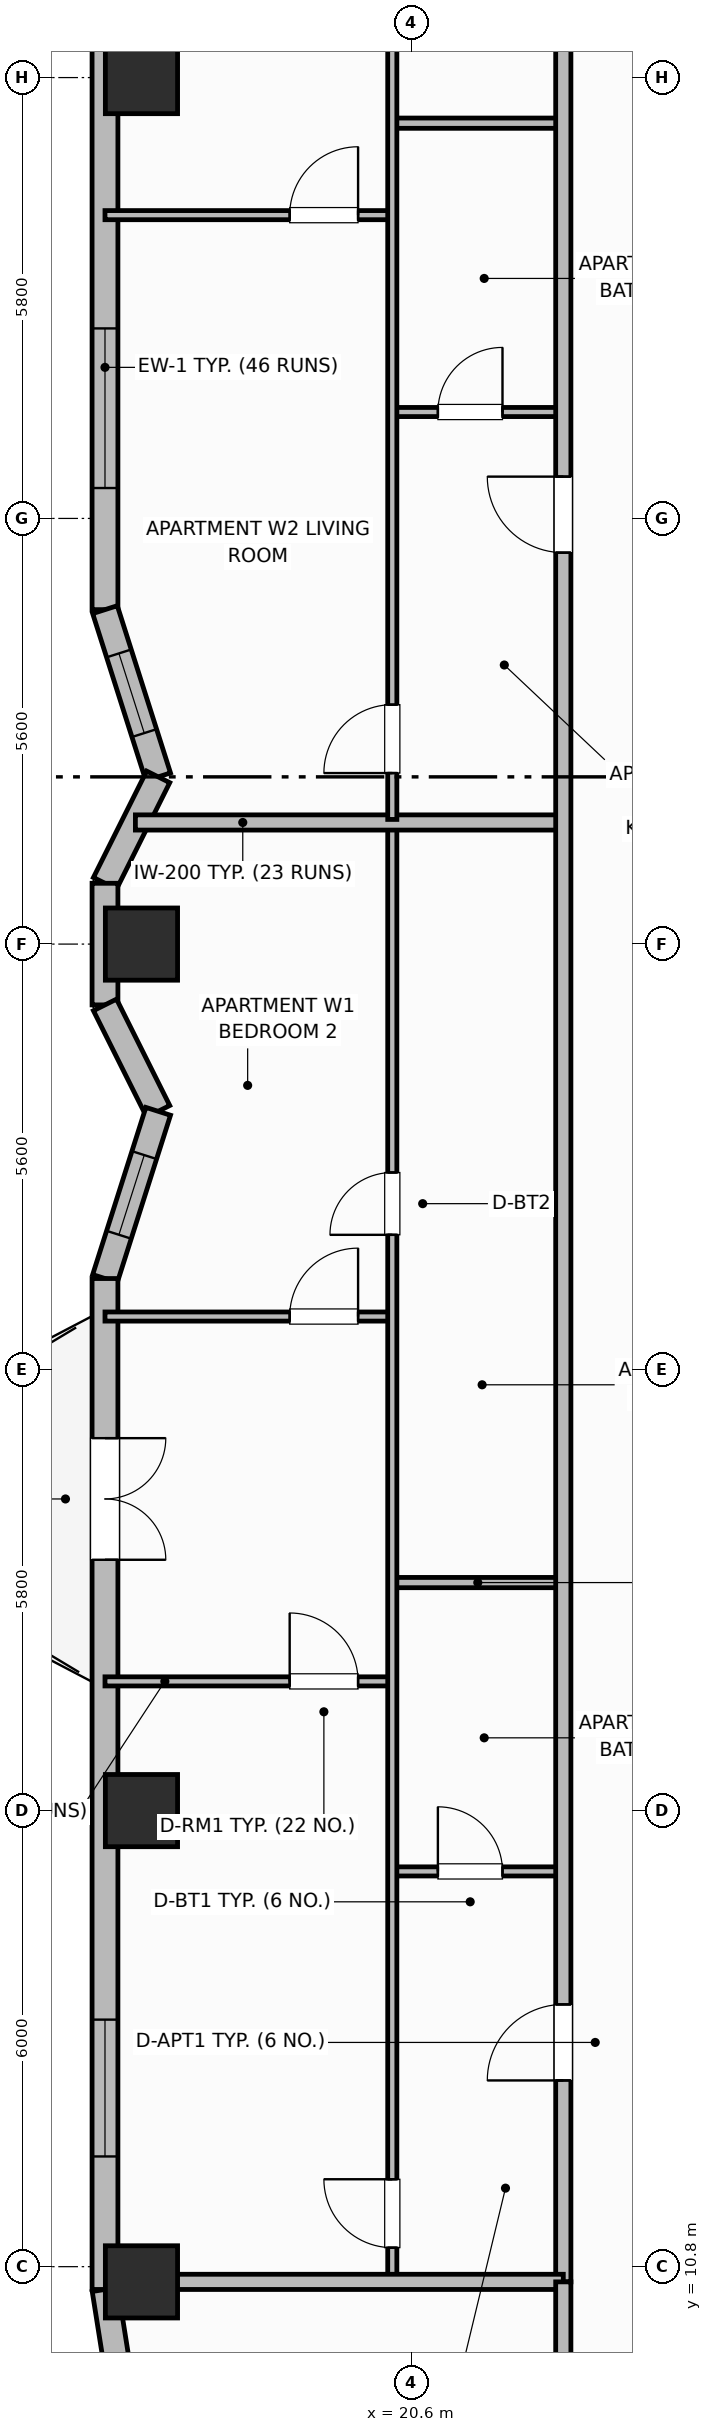
"""IFC4 building model, lengths in metres.
Left out: names, types, materials, properties, quantities, classifications, styles, units other than length and angle.
Written with IfcOpenShell. Run it as: python <this file> out.ifc"""

import sys

from ifc_helpers import new_model, si_unit, direction, frame, frame_2d, origin, origin_2d, place, context, subcontext, project, spatial, rectangle, extrude, element, fill, save


model = new_model("IFC4")
c1 = context("Model", 3, precision=1e-05, world=origin(), true_north=direction((0.0, 1.0)))
c2 = subcontext(c1, "Body", "Model", "MODEL_VIEW")
j1 = project(units=[si_unit("LENGTHUNIT", "METRE"), si_unit("PLANEANGLEUNIT", "RADIAN")], contexts=[c1])
p1 = place(None, origin())
s1 = spatial("IfcSite", under=j1, at=p1, CompositionType="ELEMENT")
p2 = place(p1, origin())
s2 = spatial("IfcBuilding", under=s1, at=p2, CompositionType="ELEMENT")
p3 = place(p2, frame((0.0, 0.0, 181.1)))
s3 = spatial("IfcBuildingStorey", under=s2, at=p3, CompositionType="ELEMENT", Elevation=181.1)
for number, where, z_axis, x_axis in (
    (1, (17.05, 10.6, 0.0), (0.0, 0.0, 1.0), (1.0, 0.0, 0.0)),
    (2, (17.05, 16.8, 0.0), (0.0, 0.0, 1.0), (1.0, 0.0, 0.0)),
    (3, (17.05, 28.2, 0.0), (0.0, 0.0, 1.0), (1.0, 0.0, 0.0)),
    (4, (17.05, 39.6, 0.0), (0.0, 0.0, 1.0), (1.0, 0.0, 0.0)),
):
    element("IfcColumn", number, at=place(p3, frame(where, z_axis=z_axis, x_axis=x_axis)), inside=s3, PredefinedType="COLUMN", context=c2, shape_type="SweptSolid", body=[
        extrude(rectangle(XDim=0.95, YDim=0.95, at=origin_2d()), origin(), (0.0, 0.0, 1.0), 3.7),
    ])
p4 = place(p3, frame((16.57, 10.5, 0.0), z_axis=(0.0, 0.0, 1.0), x_axis=(0.156514556949, -0.987675651954, 0.0)))
e5 = element("IfcWall", 5, at=p4, inside=s3, PredefinedType="SOLIDWALL", context=c2, shape_type="SweptSolid", body=[
    extrude(rectangle(XDim=1.135, YDim=0.34, at=frame_2d((0.568, 0.0))), origin(), (0.0, 0.0, 1.0), 2.72),
])
p5 = place(p3, frame((16.57, 45.9, 0.0), z_axis=(0.0, 0.0, 1.0), x_axis=(0.0, -1.0, 0.0)))
e6 = element("IfcWall", 6, at=p5, inside=s3, PredefinedType="SOLIDWALL", context=c2, shape_type="SweptSolid", body=[
    extrude(rectangle(XDim=13.3, YDim=0.34, at=frame_2d((6.65, 0.0))), origin(), (0.0, 0.0, 1.0), 2.72),
])
p6 = place(p5, frame((1.6, 0.0, 0.7)))
e7 = element("IfcOpeningElement", 7, at=p6, cuts=e6, PredefinedType="OPENING", context=c2, shape_type="SweptSolid", body=[
    extrude(rectangle(XDim=2.1, YDim=1.9, at=frame_2d((1.05, 0.95))), frame((0.0, 0.18, 0.0), z_axis=(0.0, -1.0, 0.0), x_axis=(1.0, 0.0, 0.0)), (0.0, 0.0, 1.0), 0.36),
])
p7 = place(p5, frame((9.6, 0.0, 0.7)))
e8 = element("IfcOpeningElement", 8, at=p7, cuts=e6, PredefinedType="OPENING", context=c2, shape_type="SweptSolid", body=[
    extrude(rectangle(XDim=2.1, YDim=1.9, at=frame_2d((1.05, 0.95))), frame((0.0, 0.18, 0.0), z_axis=(0.0, -1.0, 0.0), x_axis=(1.0, 0.0, 0.0)), (0.0, 0.0, 1.0), 0.36),
])
p8 = place(p3, frame((16.57, 32.6, 0.0), z_axis=(0.0, 0.0, 1.0), x_axis=(0.303160011437, -0.952939666225, 0.0)))
e9 = element("IfcWall", 9, at=p8, inside=s3, PredefinedType="SOLIDWALL", context=c2, shape_type="SweptSolid", body=[
    extrude(rectangle(XDim=2.309, YDim=0.34, at=frame_2d((1.154, 0.0))), origin(), (0.0, 0.0, 1.0), 2.72),
])
p9 = place(p8, frame((0.604, 0.0, 0.91)))
e10 = element("IfcOpeningElement", 10, at=p9, cuts=e9, PredefinedType="OPENING", context=c2, shape_type="SweptSolid", body=[
    extrude(rectangle(XDim=1.1, YDim=1.65, at=frame_2d((0.55, 0.825))), frame((0.0, 0.18, 0.0), z_axis=(0.0, -1.0, 0.0), x_axis=(1.0, 0.0, 0.0)), (0.0, 0.0, 1.0), 0.36),
])
p10 = place(p3, frame((17.27, 30.4, 0.0), z_axis=(0.0, 0.0, 1.0), x_axis=(-0.4472135955, -0.894427191, 0.0)))
e11 = element("IfcWall", 11, at=p10, inside=s3, PredefinedType="SOLIDWALL", context=c2, shape_type="SweptSolid", body=[
    extrude(rectangle(XDim=1.565, YDim=0.34, at=frame_2d((0.783, 0.0))), origin(), (0.0, 0.0, 1.0), 2.72),
])
p11 = place(p3, frame((16.57, 29.0, 0.0), z_axis=(0.0, 0.0, 1.0), x_axis=(0.0, -1.0, 0.0)))
e12 = element("IfcWall", 12, at=p11, inside=s3, PredefinedType="SOLIDWALL", context=c2, shape_type="SweptSolid", body=[
    extrude(rectangle(XDim=1.6, YDim=0.34, at=frame_2d((0.8, 0.0))), origin(), (0.0, 0.0, 1.0), 2.72),
])
p12 = place(p3, frame((16.57, 27.4, 0.0), z_axis=(0.0, 0.0, 1.0), x_axis=(0.4472135955, -0.894427191, 0.0)))
e13 = element("IfcWall", 13, at=p12, inside=s3, PredefinedType="SOLIDWALL", context=c2, shape_type="SweptSolid", body=[
    extrude(rectangle(XDim=1.565, YDim=0.34, at=frame_2d((0.783, 0.0))), origin(), (0.0, 0.0, 1.0), 2.72),
])
p13 = place(p3, frame((17.27, 26.0, 0.0), z_axis=(0.0, 0.0, 1.0), x_axis=(-0.303190562272, -0.952929946507, 0.0)))
e14 = element("IfcWall", 14, at=p13, inside=s3, PredefinedType="SOLIDWALL", context=c2, shape_type="SweptSolid", body=[
    extrude(rectangle(XDim=2.309, YDim=0.34, at=frame_2d((1.154, 0.0))), origin(), (0.0, 0.0, 1.0), 2.72),
])
p14 = place(p13, frame((0.604, 0.0, 0.91)))
e15 = element("IfcOpeningElement", 15, at=p14, cuts=e14, PredefinedType="OPENING", context=c2, shape_type="SweptSolid", body=[
    extrude(rectangle(XDim=1.1, YDim=1.65, at=frame_2d((0.55, 0.825))), frame((0.0, 0.18, 0.0), z_axis=(0.0, -1.0, 0.0), x_axis=(1.0, 0.0, 0.0)), (0.0, 0.0, 1.0), 0.36),
])
p15 = place(p3, frame((16.57, 23.8, 0.0), z_axis=(0.0, 0.0, 1.0), x_axis=(0.0, -1.0, 0.0)))
e16 = element("IfcWall", 16, at=p15, inside=s3, PredefinedType="SOLIDWALL", context=c2, shape_type="SweptSolid", body=[
    extrude(rectangle(XDim=13.3, YDim=0.34, at=frame_2d((6.65, 0.0))), origin(), (0.0, 0.0, 1.0), 2.72),
])
p16 = place(p15, frame((2.1, 0.0, 0.0)))
e17 = element("IfcOpeningElement", 17, at=p16, cuts=e16, PredefinedType="OPENING", context=c2, shape_type="SweptSolid", body=[
    extrude(rectangle(XDim=1.6, YDim=2.1, at=frame_2d((0.8, 1.05))), frame((0.0, 0.18, 0.0), z_axis=(0.0, -1.0, 0.0), x_axis=(1.0, 0.0, 0.0)), (0.0, 0.0, 1.0), 0.36),
])
p17 = place(p15, frame((9.75, 0.0, 0.75)))
e18 = element("IfcOpeningElement", 18, at=p17, cuts=e16, PredefinedType="OPENING", context=c2, shape_type="SweptSolid", body=[
    extrude(rectangle(XDim=1.8, YDim=1.85, at=frame_2d((0.9, 0.925))), frame((0.0, 0.18, 0.0), z_axis=(0.0, -1.0, 0.0), x_axis=(1.0, 0.0, 0.0)), (0.0, 0.0, 1.0), 0.36),
])
p18 = place(p3, frame((20.35, 16.0, 0.0), z_axis=(0.0, 0.0, 1.0), x_axis=(1.0, 0.0, 0.0)))
e19 = element("IfcWall", 19, at=p18, inside=s3, PredefinedType="PARTITIONING", context=c2, shape_type="SweptSolid", body=[
    extrude(rectangle(XDim=2.25, YDim=0.12, at=frame_2d((1.125, 0.0))), origin(), (0.0, 0.0, 1.0), 2.55),
])
p19 = place(p18, frame((0.6, 0.0, 0.0)))
e20 = element("IfcOpeningElement", 20, at=p19, cuts=e19, PredefinedType="OPENING", context=c2, shape_type="SweptSolid", body=[
    extrude(rectangle(XDim=0.85, YDim=2.1, at=frame_2d((0.425, 1.05))), frame((0.0, 0.07, 0.0), z_axis=(0.0, -1.0, 0.0), x_axis=(1.0, 0.0, 0.0)), (0.0, 0.0, 1.0), 0.14),
])
p20 = place(p3, frame((20.35, 19.8, 0.0), z_axis=(0.0, 0.0, 1.0), x_axis=(1.0, 0.0, 0.0)))
e21 = element("IfcWall", 21, at=p20, inside=s3, PredefinedType="PARTITIONING", context=c2, shape_type="SweptSolid", body=[
    extrude(rectangle(XDim=2.25, YDim=0.135, at=frame_2d((1.125, 0.0))), origin(), (0.0, 0.0, 1.0), 2.55),
])
p21 = place(p3, frame((16.57, 18.5, 0.0), z_axis=(0.0, 0.0, 1.0), x_axis=(1.0, 0.0, 0.0)))
e22 = element("IfcWall", 22, at=p21, inside=s3, PredefinedType="PARTITIONING", context=c2, shape_type="SweptSolid", body=[
    extrude(rectangle(XDim=3.78, YDim=0.12, at=frame_2d((1.89, 0.0))), origin(), (0.0, 0.0, 1.0), 2.55),
])
p22 = place(p21, frame((2.43, 0.0, 0.0)))
e23 = element("IfcOpeningElement", 23, at=p22, cuts=e22, PredefinedType="OPENING", context=c2, shape_type="SweptSolid", body=[
    extrude(rectangle(XDim=0.9, YDim=2.1, at=frame_2d((0.45, 1.05))), frame((0.0, 0.07, 0.0), z_axis=(0.0, -1.0, 0.0), x_axis=(1.0, 0.0, 0.0)), (0.0, 0.0, 1.0), 0.14),
])
p23 = place(p3, frame((16.57, 23.3, 0.0), z_axis=(0.0, 0.0, 1.0), x_axis=(1.0, 0.0, 0.0)))
e24 = element("IfcWall", 24, at=p23, inside=s3, PredefinedType="PARTITIONING", context=c2, shape_type="SweptSolid", body=[
    extrude(rectangle(XDim=3.78, YDim=0.12, at=frame_2d((1.89, 0.0))), origin(), (0.0, 0.0, 1.0), 2.55),
])
p24 = place(p23, frame((2.43, 0.0, 0.0)))
e25 = element("IfcOpeningElement", 25, at=p24, cuts=e24, PredefinedType="OPENING", context=c2, shape_type="SweptSolid", body=[
    extrude(rectangle(XDim=0.9, YDim=2.1, at=frame_2d((0.45, 1.05))), frame((0.0, 0.07, 0.0), z_axis=(0.0, -1.0, 0.0), x_axis=(1.0, 0.0, 0.0)), (0.0, 0.0, 1.0), 0.14),
])
p25 = place(p3, frame((20.35, 10.64, 0.0), z_axis=(0.0, 0.0, 1.0), x_axis=(0.0, 1.0, 0.0)))
e26 = element("IfcWall", 26, at=p25, inside=s3, PredefinedType="PARTITIONING", context=c2, shape_type="SweptSolid", body=[
    extrude(rectangle(XDim=19.12, YDim=0.12, at=frame_2d((9.56, 0.0))), origin(), (0.0, 0.0, 1.0), 2.55),
])
p26 = place(p25, frame((0.41, 0.0, 0.0)))
e27 = element("IfcOpeningElement", 27, at=p26, cuts=e26, PredefinedType="OPENING", context=c2, shape_type="SweptSolid", body=[
    extrude(rectangle(XDim=0.9, YDim=2.1, at=frame_2d((0.45, 1.05))), frame((0.0, 0.07, 0.0), z_axis=(0.0, -1.0, 0.0), x_axis=(1.0, 0.0, 0.0)), (0.0, 0.0, 1.0), 0.14),
])
p27 = place(p25, frame((13.735, 0.0, 0.0)))
e28 = element("IfcOpeningElement", 28, at=p27, cuts=e26, PredefinedType="OPENING", context=c2, shape_type="SweptSolid", body=[
    extrude(rectangle(XDim=0.82, YDim=2.08, at=frame_2d((0.41, 1.04))), frame((0.0, 0.07, 0.0), z_axis=(0.0, -1.0, 0.0), x_axis=(1.0, 0.0, 0.0)), (0.0, 0.0, 1.0), 0.14),
])
p28 = place(p3, frame((16.97, 29.8, 0.0), z_axis=(0.0, 0.0, 1.0), x_axis=(1.0, 0.0, 0.0)))
e29 = element("IfcWall", 29, at=p28, inside=s3, PredefinedType="PARTITIONING", context=c2, shape_type="SweptSolid", body=[
    extrude(rectangle(XDim=5.63, YDim=0.2, at=frame_2d((2.815, 0.0))), origin(), (0.0, 0.0, 1.0), 2.55),
])
p29 = place(p3, frame((20.35, 35.2, 0.0), z_axis=(0.0, 0.0, 1.0), x_axis=(1.0, 0.0, 0.0)))
e30 = element("IfcWall", 30, at=p29, inside=s3, PredefinedType="PARTITIONING", context=c2, shape_type="SweptSolid", body=[
    extrude(rectangle(XDim=2.25, YDim=0.12, at=frame_2d((1.125, 0.0))), origin(), (0.0, 0.0, 1.0), 2.55),
])
p30 = place(p29, frame((0.6, 0.0, 0.0)))
e31 = element("IfcOpeningElement", 31, at=p30, cuts=e30, PredefinedType="OPENING", context=c2, shape_type="SweptSolid", body=[
    extrude(rectangle(XDim=0.85, YDim=2.1, at=frame_2d((0.425, 1.05))), frame((0.0, 0.07, 0.0), z_axis=(0.0, -1.0, 0.0), x_axis=(1.0, 0.0, 0.0)), (0.0, 0.0, 1.0), 0.14),
])
p31 = place(p3, frame((20.35, 39.0, 0.0), z_axis=(0.0, 0.0, 1.0), x_axis=(1.0, 0.0, 0.0)))
e32 = element("IfcWall", 32, at=p31, inside=s3, PredefinedType="PARTITIONING", context=c2, shape_type="SweptSolid", body=[
    extrude(rectangle(XDim=2.25, YDim=0.135, at=frame_2d((1.125, 0.0))), origin(), (0.0, 0.0, 1.0), 2.55),
])
p32 = place(p3, frame((16.57, 37.79, 0.0), z_axis=(0.0, 0.0, 1.0), x_axis=(1.0, 0.0, 0.0)))
e33 = element("IfcWall", 33, at=p32, inside=s3, PredefinedType="PARTITIONING", context=c2, shape_type="SweptSolid", body=[
    extrude(rectangle(XDim=3.78, YDim=0.12, at=frame_2d((1.89, 0.0))), origin(), (0.0, 0.0, 1.0), 2.55),
])
p33 = place(p32, frame((2.43, 0.0, 0.0)))
e34 = element("IfcOpeningElement", 34, at=p33, cuts=e33, PredefinedType="OPENING", context=c2, shape_type="SweptSolid", body=[
    extrude(rectangle(XDim=0.9, YDim=2.1, at=frame_2d((0.45, 1.05))), frame((0.0, 0.07, 0.0), z_axis=(0.0, -1.0, 0.0), x_axis=(1.0, 0.0, 0.0)), (0.0, 0.0, 1.0), 0.14),
])
p34 = place(p3, frame((20.35, 29.84, 0.0), z_axis=(0.0, 0.0, 1.0), x_axis=(0.0, 1.0, 0.0)))
e35 = element("IfcWall", 35, at=p34, inside=s3, PredefinedType="PARTITIONING", context=c2, shape_type="SweptSolid", body=[
    extrude(rectangle(XDim=15.92, YDim=0.12, at=frame_2d((7.96, 0.0))), origin(), (0.0, 0.0, 1.0), 2.55),
])
p35 = place(p34, frame((0.61, 0.0, 0.0)))
e36 = element("IfcOpeningElement", 36, at=p35, cuts=e35, PredefinedType="OPENING", context=c2, shape_type="SweptSolid", body=[
    extrude(rectangle(XDim=0.9, YDim=2.1, at=frame_2d((0.45, 1.05))), frame((0.0, 0.07, 0.0), z_axis=(0.0, -1.0, 0.0), x_axis=(1.0, 0.0, 0.0)), (0.0, 0.0, 1.0), 0.14),
])
p36 = place(p34, frame((12.135, 0.0, 0.0)))
e37 = element("IfcOpeningElement", 37, at=p36, cuts=e35, PredefinedType="OPENING", context=c2, shape_type="SweptSolid", body=[
    extrude(rectangle(XDim=0.82, YDim=2.08, at=frame_2d((0.41, 1.04))), frame((0.0, 0.07, 0.0), z_axis=(0.0, -1.0, 0.0), x_axis=(1.0, 0.0, 0.0)), (0.0, 0.0, 1.0), 0.14),
])
p37 = place(p3, frame((22.6, 10.6, 0.0), z_axis=(0.0, 0.0, 1.0), x_axis=(0.0, 1.0, 0.0)))
e38 = element("IfcWall", 38, at=p37, inside=s3, PredefinedType="PARTITIONING", context=c2, shape_type="SweptSolid", body=[
    extrude(rectangle(XDim=35.2, YDim=0.2, at=frame_2d((17.6, 0.0))), origin(), (0.0, 0.0, 1.0), 2.55),
])
p38 = place(p37, frame((2.65, 0.0, 0.0)))
e39 = element("IfcOpeningElement", 39, at=p38, cuts=e38, PredefinedType="OPENING", context=c2, shape_type="SweptSolid", body=[
    extrude(rectangle(XDim=1.0, YDim=2.15, at=frame_2d((0.5, 1.075))), frame((0.0, 0.11, 0.0), z_axis=(0.0, -1.0, 0.0), x_axis=(1.0, 0.0, 0.0)), (0.0, 0.0, 1.0), 0.22),
])
p39 = place(p37, frame((22.75, 0.0, 0.0)))
e40 = element("IfcOpeningElement", 40, at=p39, cuts=e38, PredefinedType="OPENING", context=c2, shape_type="SweptSolid", body=[
    extrude(rectangle(XDim=1.0, YDim=2.15, at=frame_2d((0.5, 1.075))), frame((0.0, 0.11, 0.0), z_axis=(0.0, -1.0, 0.0), x_axis=(1.0, 0.0, 0.0)), (0.0, 0.0, 1.0), 0.22),
])
p40 = place(p3, frame((16.99, 10.6, 0.0), z_axis=(0.0, 0.0, 1.0), x_axis=(1.0, 0.0, 0.0)))
e41 = element("IfcWall", 41, at=p40, inside=s3, PredefinedType="PARTITIONING", context=c2, shape_type="SweptSolid", body=[
    extrude(rectangle(XDim=5.61, YDim=0.2, at=frame_2d((2.805, 0.0))), origin(), (0.0, 0.0, 1.0), 2.55),
])
p41 = place(p3, frame((22.6, 6.87, 0.0), z_axis=(0.0, 0.0, 1.0), x_axis=(0.0, 1.0, 0.0)))
e42 = element("IfcWall", 42, at=p41, inside=s3, PredefinedType="PARTITIONING", context=c2, shape_type="SweptSolid", body=[
    extrude(rectangle(XDim=3.73, YDim=0.2, at=frame_2d((1.865, 0.0))), origin(), (0.0, 0.0, 1.0), 2.55),
])
p42 = place(p7, origin())
e43 = element("IfcWindow", 43, at=p42, inside=s3, PartitioningType="SINGLE_PANEL", PredefinedType="WINDOW", context=c2, shape_type="SweptSolid", body=[
    extrude(rectangle(XDim=2.1, YDim=1.9, at=frame_2d((1.05, 0.95))), frame((0.0, 0.03, 0.0), z_axis=(0.0, -1.0, 0.0), x_axis=(1.0, 0.0, 0.0)), (0.0, 0.0, 1.0), 0.06),
])
fill(e8, e43)
p43 = place(p9, origin())
e44 = element("IfcWindow", 44, at=p43, inside=s3, PartitioningType="SINGLE_PANEL", PredefinedType="WINDOW", context=c2, shape_type="SweptSolid", body=[
    extrude(rectangle(XDim=1.1, YDim=1.65, at=frame_2d((0.55, 0.825))), frame((0.0, 0.03, 0.0), z_axis=(0.0, -1.0, 0.0), x_axis=(1.0, 0.0, 0.0)), (0.0, 0.0, 1.0), 0.06),
])
fill(e10, e44)
p44 = place(p14, origin())
e45 = element("IfcWindow", 45, at=p44, inside=s3, PartitioningType="SINGLE_PANEL", PredefinedType="WINDOW", context=c2, shape_type="SweptSolid", body=[
    extrude(rectangle(XDim=1.1, YDim=1.65, at=frame_2d((0.55, 0.825))), frame((0.0, 0.03, 0.0), z_axis=(0.0, -1.0, 0.0), x_axis=(1.0, 0.0, 0.0)), (0.0, 0.0, 1.0), 0.06),
])
fill(e15, e45)
p45 = place(p16, origin())
e46 = element("IfcDoor", 46, at=p45, inside=s3, OperationType="DOUBLE_DOOR_SINGLE_SWING", PredefinedType="DOOR", context=c2, shape_type="SweptSolid", body=[
    extrude(rectangle(XDim=1.6, YDim=2.1, at=frame_2d((0.8, 1.05))), frame((0.0, 0.025, 0.0), z_axis=(0.0, -1.0, 0.0), x_axis=(1.0, 0.0, 0.0)), (0.0, 0.0, 1.0), 0.05),
])
fill(e17, e46)
p46 = place(p17, origin())
e47 = element("IfcWindow", 47, at=p46, inside=s3, PartitioningType="SINGLE_PANEL", PredefinedType="WINDOW", context=c2, shape_type="SweptSolid", body=[
    extrude(rectangle(XDim=1.8, YDim=1.85, at=frame_2d((0.9, 0.925))), frame((0.0, 0.03, 0.0), z_axis=(0.0, -1.0, 0.0), x_axis=(1.0, 0.0, 0.0)), (0.0, 0.0, 1.0), 0.06),
])
fill(e18, e47)
p47 = place(p19, origin())
e48 = element("IfcDoor", 48, at=p47, inside=s3, OperationType="SINGLE_SWING_LEFT", PredefinedType="DOOR", context=c2, shape_type="SweptSolid", body=[
    extrude(rectangle(XDim=0.85, YDim=2.1, at=frame_2d((0.425, 1.05))), frame((0.0, 0.025, 0.0), z_axis=(0.0, -1.0, 0.0), x_axis=(1.0, 0.0, 0.0)), (0.0, 0.0, 1.0), 0.05),
])
fill(e20, e48)
p48 = place(p22, origin())
e49 = element("IfcDoor", 49, at=p48, inside=s3, OperationType="SINGLE_SWING_LEFT", PredefinedType="DOOR", context=c2, shape_type="SweptSolid", body=[
    extrude(rectangle(XDim=0.9, YDim=2.1, at=frame_2d((0.45, 1.05))), frame((0.0, 0.025, 0.0), z_axis=(0.0, -1.0, 0.0), x_axis=(1.0, 0.0, 0.0)), (0.0, 0.0, 1.0), 0.05),
])
fill(e23, e49)
p49 = place(p24, origin())
e50 = element("IfcDoor", 50, at=p49, inside=s3, OperationType="SINGLE_SWING_RIGHT", PredefinedType="DOOR", context=c2, shape_type="SweptSolid", body=[
    extrude(rectangle(XDim=0.9, YDim=2.1, at=frame_2d((0.45, 1.05))), frame((0.0, 0.025, 0.0), z_axis=(0.0, -1.0, 0.0), x_axis=(1.0, 0.0, 0.0)), (0.0, 0.0, 1.0), 0.05),
])
fill(e25, e50)
p50 = place(p26, origin())
e51 = element("IfcDoor", 51, at=p50, inside=s3, OperationType="SINGLE_SWING_RIGHT", PredefinedType="DOOR", context=c2, shape_type="SweptSolid", body=[
    extrude(rectangle(XDim=0.9, YDim=2.1, at=frame_2d((0.45, 1.05))), frame((0.0, 0.025, 0.0), z_axis=(0.0, -1.0, 0.0), x_axis=(1.0, 0.0, 0.0)), (0.0, 0.0, 1.0), 0.05),
])
fill(e27, e51)
p51 = place(p27, origin())
e52 = element("IfcDoor", 52, at=p51, inside=s3, OperationType="SINGLE_SWING_LEFT", PredefinedType="DOOR", context=c2, shape_type="SweptSolid", body=[
    extrude(rectangle(XDim=0.82, YDim=2.08, at=frame_2d((0.41, 1.04))), frame((0.0, 0.025, 0.0), z_axis=(0.0, -1.0, 0.0), x_axis=(1.0, 0.0, 0.0)), (0.0, 0.0, 1.0), 0.05),
])
fill(e28, e52)
p52 = place(p30, origin())
e53 = element("IfcDoor", 53, at=p52, inside=s3, OperationType="SINGLE_SWING_RIGHT", PredefinedType="DOOR", context=c2, shape_type="SweptSolid", body=[
    extrude(rectangle(XDim=0.85, YDim=2.1, at=frame_2d((0.425, 1.05))), frame((0.0, 0.025, 0.0), z_axis=(0.0, -1.0, 0.0), x_axis=(1.0, 0.0, 0.0)), (0.0, 0.0, 1.0), 0.05),
])
fill(e31, e53)
p53 = place(p33, origin())
e54 = element("IfcDoor", 54, at=p53, inside=s3, OperationType="SINGLE_SWING_RIGHT", PredefinedType="DOOR", context=c2, shape_type="SweptSolid", body=[
    extrude(rectangle(XDim=0.9, YDim=2.1, at=frame_2d((0.45, 1.05))), frame((0.0, 0.025, 0.0), z_axis=(0.0, -1.0, 0.0), x_axis=(1.0, 0.0, 0.0)), (0.0, 0.0, 1.0), 0.05),
])
fill(e34, e54)
p54 = place(p35, origin())
e55 = element("IfcDoor", 55, at=p54, inside=s3, OperationType="SINGLE_SWING_LEFT", PredefinedType="DOOR", context=c2, shape_type="SweptSolid", body=[
    extrude(rectangle(XDim=0.9, YDim=2.1, at=frame_2d((0.45, 1.05))), frame((0.0, 0.025, 0.0), z_axis=(0.0, -1.0, 0.0), x_axis=(1.0, 0.0, 0.0)), (0.0, 0.0, 1.0), 0.05),
])
fill(e36, e55)
p55 = place(p38, origin())
e56 = element("IfcDoor", 56, at=p55, inside=s3, OperationType="SINGLE_SWING_LEFT", PredefinedType="DOOR", context=c2, shape_type="SweptSolid", body=[
    extrude(rectangle(XDim=1.0, YDim=2.15, at=frame_2d((0.5, 1.075))), frame((0.0, 0.025, 0.0), z_axis=(0.0, -1.0, 0.0), x_axis=(1.0, 0.0, 0.0)), (0.0, 0.0, 1.0), 0.05),
])
fill(e39, e56)
p56 = place(p39, origin())
e57 = element("IfcDoor", 57, at=p56, inside=s3, OperationType="SINGLE_SWING_RIGHT", PredefinedType="DOOR", context=c2, shape_type="SweptSolid", body=[
    extrude(rectangle(XDim=1.0, YDim=2.15, at=frame_2d((0.5, 1.075))), frame((0.0, 0.025, 0.0), z_axis=(0.0, -1.0, 0.0), x_axis=(1.0, 0.0, 0.0)), (0.0, 0.0, 1.0), 0.05),
])
fill(e40, e57)
save(model, sys.argv[1])
